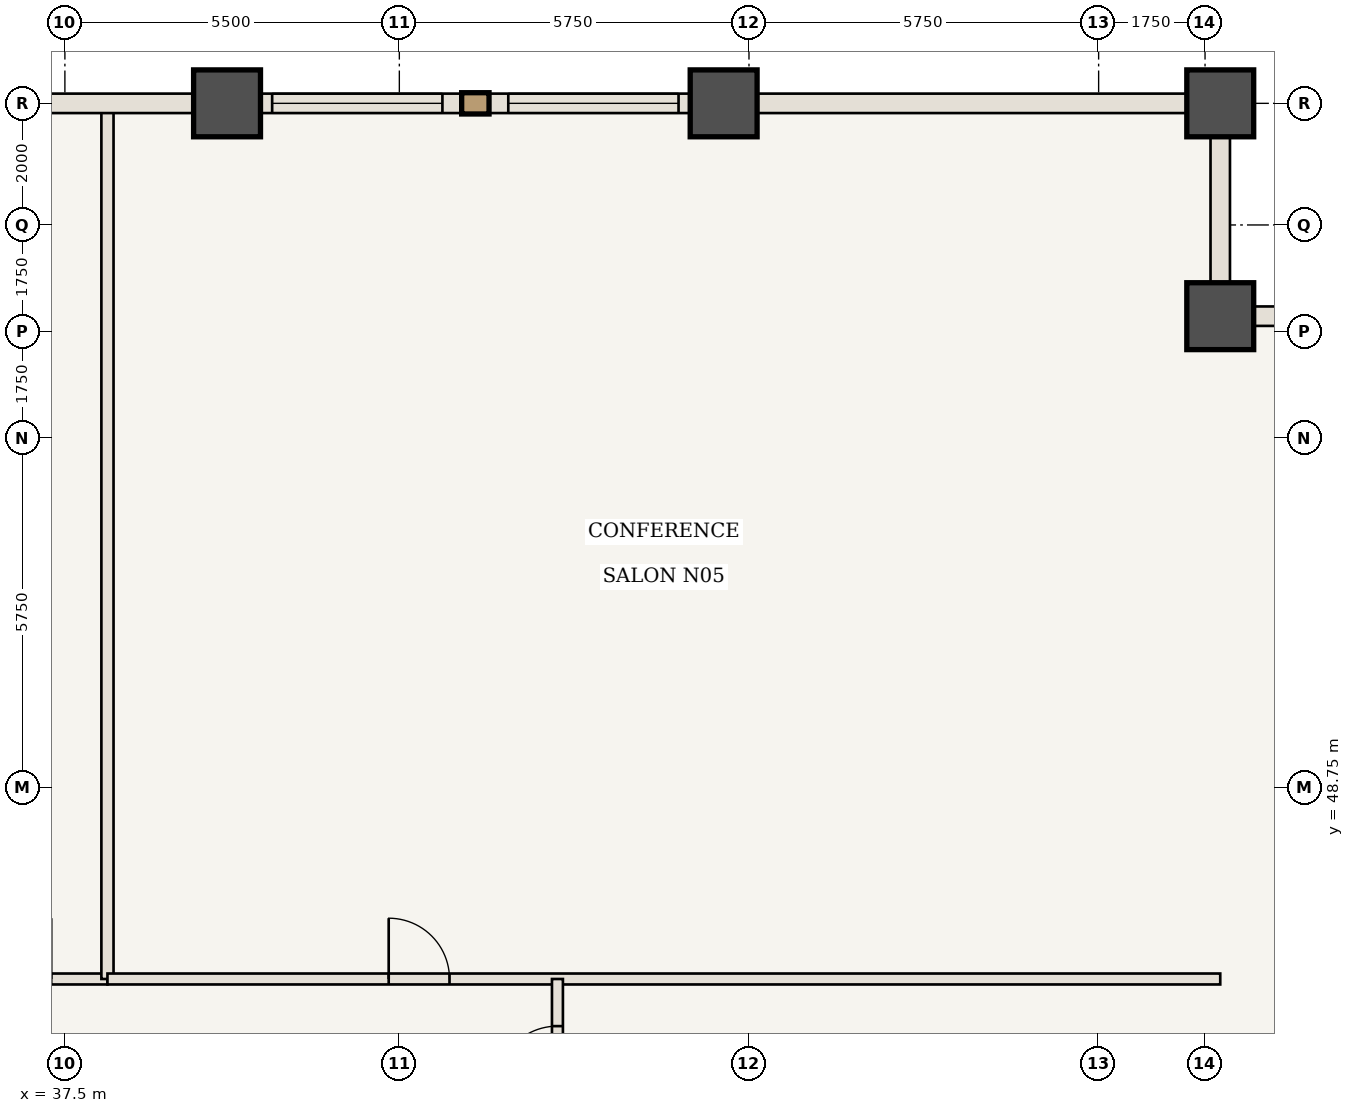
"""IFC4 building model, lengths in metres.
Left out: names, types, materials, properties, quantities, classifications, styles, units other than length and angle.
Written with IfcOpenShell. Run it as: python <this file> out.ifc"""

import sys

from ifc_helpers import new_model, si_unit, direction, frame, frame_2d, origin, origin_2d, place, context, subcontext, project, spatial, rectangle, extrude, element, fill, save


model = new_model("IFC4")
c1 = context("Model", 3, precision=1e-05, world=origin(), true_north=direction((0.0, 1.0)))
c2 = subcontext(c1, "Body", "Model", "MODEL_VIEW")
j1 = project(units=[si_unit("LENGTHUNIT", "METRE"), si_unit("PLANEANGLEUNIT", "RADIAN")], contexts=[c1])
p1 = place(None, origin())
s1 = spatial("IfcSite", under=j1, at=p1, CompositionType="ELEMENT")
p2 = place(p1, origin())
s2 = spatial("IfcBuilding", under=s1, at=p2, CompositionType="ELEMENT")
p3 = place(p2, frame((0.0, 0.0, 45.85)))
s3 = spatial("IfcBuildingStorey", under=s2, at=p3, CompositionType="ELEMENT", Elevation=45.85)
for number, where, z_axis, x_axis in (
    (1, (56.5, 56.5, 0.0), (0.0, 0.0, 1.0), (1.0, 0.0, 0.0)),
    (2, (56.5, 60.0, 0.0), (0.0, 0.0, 1.0), (1.0, 0.0, 0.0)),
    (3, (40.167, 60.0, 0.0), (0.0, 0.0, 1.0), (1.0, 0.0, 0.0)),
    (4, (48.333, 60.0, 0.0), (0.0, 0.0, 1.0), (1.0, 0.0, 0.0)),
):
    element("IfcColumn", number, at=place(p3, frame(where, z_axis=z_axis, x_axis=x_axis)), inside=s3, PredefinedType="COLUMN", context=c2, shape_type="SweptSolid", body=[
        extrude(rectangle(XDim=1.1, YDim=1.1, at=origin_2d()), origin(), (0.0, 0.0, 1.0), 3.5),
    ])
p4 = place(p3, frame((33.5, 45.6, 0.0), z_axis=(0.0, 0.0, 1.0), x_axis=(1.0, 0.0, 0.0)))
e5 = element("IfcWall", 5, at=p4, inside=s3, PredefinedType="STANDARD", context=c2, shape_type="SweptSolid", body=[
    extrude(rectangle(XDim=4.7, YDim=0.18, at=frame_2d((2.35, 0.0))), origin(), (0.0, 0.0, 1.0), 3.32),
])
p5 = place(p4, frame((2.775, 0.0, 0.0)))
e6 = element("IfcOpeningElement", 6, at=p5, cuts=e5, PredefinedType="OPENING", context=c2, shape_type="SweptSolid", body=[
    extrude(rectangle(XDim=1.0, YDim=2.15, at=frame_2d((0.5, 1.075))), frame((0.0, 0.1, 0.0), z_axis=(0.0, -1.0, 0.0), x_axis=(1.0, 0.0, 0.0)), (0.0, 0.0, 1.0), 0.2),
])
p6 = place(p3, frame((38.2, 45.6, 0.0), z_axis=(0.0, 0.0, 1.0), x_axis=(0.0, 1.0, 0.0)))
e7 = element("IfcWall", 7, at=p6, inside=s3, PredefinedType="STANDARD", context=c2, shape_type="SweptSolid", body=[
    extrude(rectangle(XDim=14.34, YDim=0.2, at=frame_2d((7.17, 0.0))), origin(), (0.0, 0.0, 1.0), 3.32),
])
p7 = place(p3, frame((38.2, 45.6, 0.0), z_axis=(0.0, 0.0, 1.0), x_axis=(1.0, 0.0, 0.0)))
e8 = element("IfcWall", 8, at=p7, inside=s3, PredefinedType="STANDARD", context=c2, shape_type="SweptSolid", body=[
    extrude(rectangle(XDim=18.3, YDim=0.18, at=frame_2d((9.15, 0.0))), origin(), (0.0, 0.0, 1.0), 3.32),
])
p8 = place(p7, frame((4.625, 0.0, 0.0)))
e9 = element("IfcOpeningElement", 9, at=p8, cuts=e8, PredefinedType="OPENING", context=c2, shape_type="SweptSolid", body=[
    extrude(rectangle(XDim=1.0, YDim=2.15, at=frame_2d((0.5, 1.075))), frame((0.0, 0.1, 0.0), z_axis=(0.0, -1.0, 0.0), x_axis=(1.0, 0.0, 0.0)), (0.0, 0.0, 1.0), 0.2),
])
p9 = place(p3, frame((45.6, 41.2, 0.0), z_axis=(0.0, 0.0, 1.0), x_axis=(0.0, 1.0, 0.0)))
e10 = element("IfcWall", 10, at=p9, inside=s3, PredefinedType="STANDARD", context=c2, shape_type="SweptSolid", body=[
    extrude(rectangle(XDim=4.4, YDim=0.18, at=frame_2d((2.2, 0.0))), origin(), (0.0, 0.0, 1.0), 3.32),
])
p10 = place(p9, frame((2.625, 0.0, 0.0)))
e11 = element("IfcOpeningElement", 11, at=p10, cuts=e10, PredefinedType="OPENING", context=c2, shape_type="SweptSolid", body=[
    extrude(rectangle(XDim=1.0, YDim=2.15, at=frame_2d((0.5, 1.075))), frame((0.0, 0.1, 0.0), z_axis=(0.0, -1.0, 0.0), x_axis=(1.0, 0.0, 0.0)), (0.0, 0.0, 1.0), 0.2),
])
p11 = place(p3, frame((32.0, 60.0, 0.0), z_axis=(0.0, 0.0, 1.0), x_axis=(1.0, 0.0, 0.0)))
e12 = element("IfcWall", 12, at=p11, inside=s3, PredefinedType="USERDEFINED", context=c2, shape_type="SweptSolid", body=[
    extrude(rectangle(XDim=8.167, YDim=0.32, at=frame_2d((4.083, 0.0))), origin(), (0.0, 0.0, 1.0), 2.52),
])
p12 = place(p11, frame((2.65, 0.0, 0.85)))
e13 = element("IfcOpeningElement", 13, at=p12, cuts=e12, PredefinedType="OPENING", context=c2, shape_type="SweptSolid", body=[
    extrude(rectangle(XDim=2.4, YDim=1.47, at=frame_2d((1.2, 0.735))), frame((0.0, 0.17, 0.0), z_axis=(0.0, -1.0, 0.0), x_axis=(1.0, 0.0, 0.0)), (0.0, 0.0, 1.0), 0.34),
])
p13 = place(p3, frame((40.167, 60.0, 0.0), z_axis=(0.0, 0.0, 1.0), x_axis=(1.0, 0.0, 0.0)))
e14 = element("IfcWall", 14, at=p13, inside=s3, PredefinedType="USERDEFINED", context=c2, shape_type="SweptSolid", body=[
    extrude(rectangle(XDim=8.167, YDim=0.32, at=frame_2d((4.083, 0.0))), origin(), (0.0, 0.0, 1.0), 2.52),
])
p14 = place(p13, frame((0.742, 0.0, 0.85)))
e15 = element("IfcOpeningElement", 15, at=p14, cuts=e14, PredefinedType="OPENING", context=c2, shape_type="SweptSolid", body=[
    extrude(rectangle(XDim=2.8, YDim=1.47, at=frame_2d((1.4, 0.735))), frame((0.0, 0.17, 0.0), z_axis=(0.0, -1.0, 0.0), x_axis=(1.0, 0.0, 0.0)), (0.0, 0.0, 1.0), 0.34),
])
p15 = place(p13, frame((4.625, 0.0, 0.85)))
e16 = element("IfcOpeningElement", 16, at=p15, cuts=e14, PredefinedType="OPENING", context=c2, shape_type="SweptSolid", body=[
    extrude(rectangle(XDim=2.8, YDim=1.47, at=frame_2d((1.4, 0.735))), frame((0.0, 0.17, 0.0), z_axis=(0.0, -1.0, 0.0), x_axis=(1.0, 0.0, 0.0)), (0.0, 0.0, 1.0), 0.34),
])
p16 = place(p3, frame((48.333, 60.0, 0.0), z_axis=(0.0, 0.0, 1.0), x_axis=(1.0, 0.0, 0.0)))
e17 = element("IfcWall", 17, at=p16, inside=s3, PredefinedType="USERDEFINED", context=c2, shape_type="SweptSolid", body=[
    extrude(rectangle(XDim=8.167, YDim=0.32, at=frame_2d((4.083, 0.0))), origin(), (0.0, 0.0, 1.0), 2.52),
])
for number, where, z_axis, x_axis in (
    (18, (56.5, 56.5, 0.0), (0.0, 0.0, 1.0), (1.0, 0.0, 0.0)),
    (19, (56.5, 60.0, 0.0), (0.0, 0.0, 1.0), (0.0, -1.0, 0.0)),
):
    element("IfcWall", number, at=place(p3, frame(where, z_axis=z_axis, x_axis=x_axis)), inside=s3, PredefinedType="USERDEFINED", context=c2, shape_type="SweptSolid", body=[
        extrude(rectangle(XDim=3.5, YDim=0.32, at=frame_2d((1.75, 0.0))), origin(), (0.0, 0.0, 1.0), 2.52),
    ])
p17 = place(p8, origin())
e20 = element("IfcDoor", 20, at=p17, inside=s3, OperationType="SINGLE_SWING_LEFT", PredefinedType="DOOR", context=c2, shape_type="SweptSolid", body=[
    extrude(rectangle(XDim=1.0, YDim=2.15, at=frame_2d((0.5, 1.075))), frame((0.0, 0.025, 0.0), z_axis=(0.0, -1.0, 0.0), x_axis=(1.0, 0.0, 0.0)), (0.0, 0.0, 1.0), 0.05),
])
fill(e9, e20)
p18 = place(p10, origin())
e21 = element("IfcDoor", 21, at=p18, inside=s3, OperationType="SINGLE_SWING_LEFT", PredefinedType="DOOR", context=c2, shape_type="SweptSolid", body=[
    extrude(rectangle(XDim=1.0, YDim=2.15, at=frame_2d((0.5, 1.075))), frame((0.0, 0.025, 0.0), z_axis=(0.0, -1.0, 0.0), x_axis=(1.0, 0.0, 0.0)), (0.0, 0.0, 1.0), 0.05),
])
fill(e11, e21)
p19 = place(p14, origin())
e22 = element("IfcWindow", 22, at=p19, inside=s3, PartitioningType="SINGLE_PANEL", PredefinedType="WINDOW", context=c2, shape_type="SweptSolid", body=[
    extrude(rectangle(XDim=2.8, YDim=1.47, at=frame_2d((1.4, 0.735))), frame((0.0, 0.03, 0.0), z_axis=(0.0, -1.0, 0.0), x_axis=(1.0, 0.0, 0.0)), (0.0, 0.0, 1.0), 0.06),
])
fill(e15, e22)
p20 = place(p15, origin())
e23 = element("IfcWindow", 23, at=p20, inside=s3, PartitioningType="SINGLE_PANEL", PredefinedType="WINDOW", context=c2, shape_type="SweptSolid", body=[
    extrude(rectangle(XDim=2.8, YDim=1.47, at=frame_2d((1.4, 0.735))), frame((0.0, 0.03, 0.0), z_axis=(0.0, -1.0, 0.0), x_axis=(1.0, 0.0, 0.0)), (0.0, 0.0, 1.0), 0.06),
])
fill(e16, e23)
save(model, sys.argv[1])
